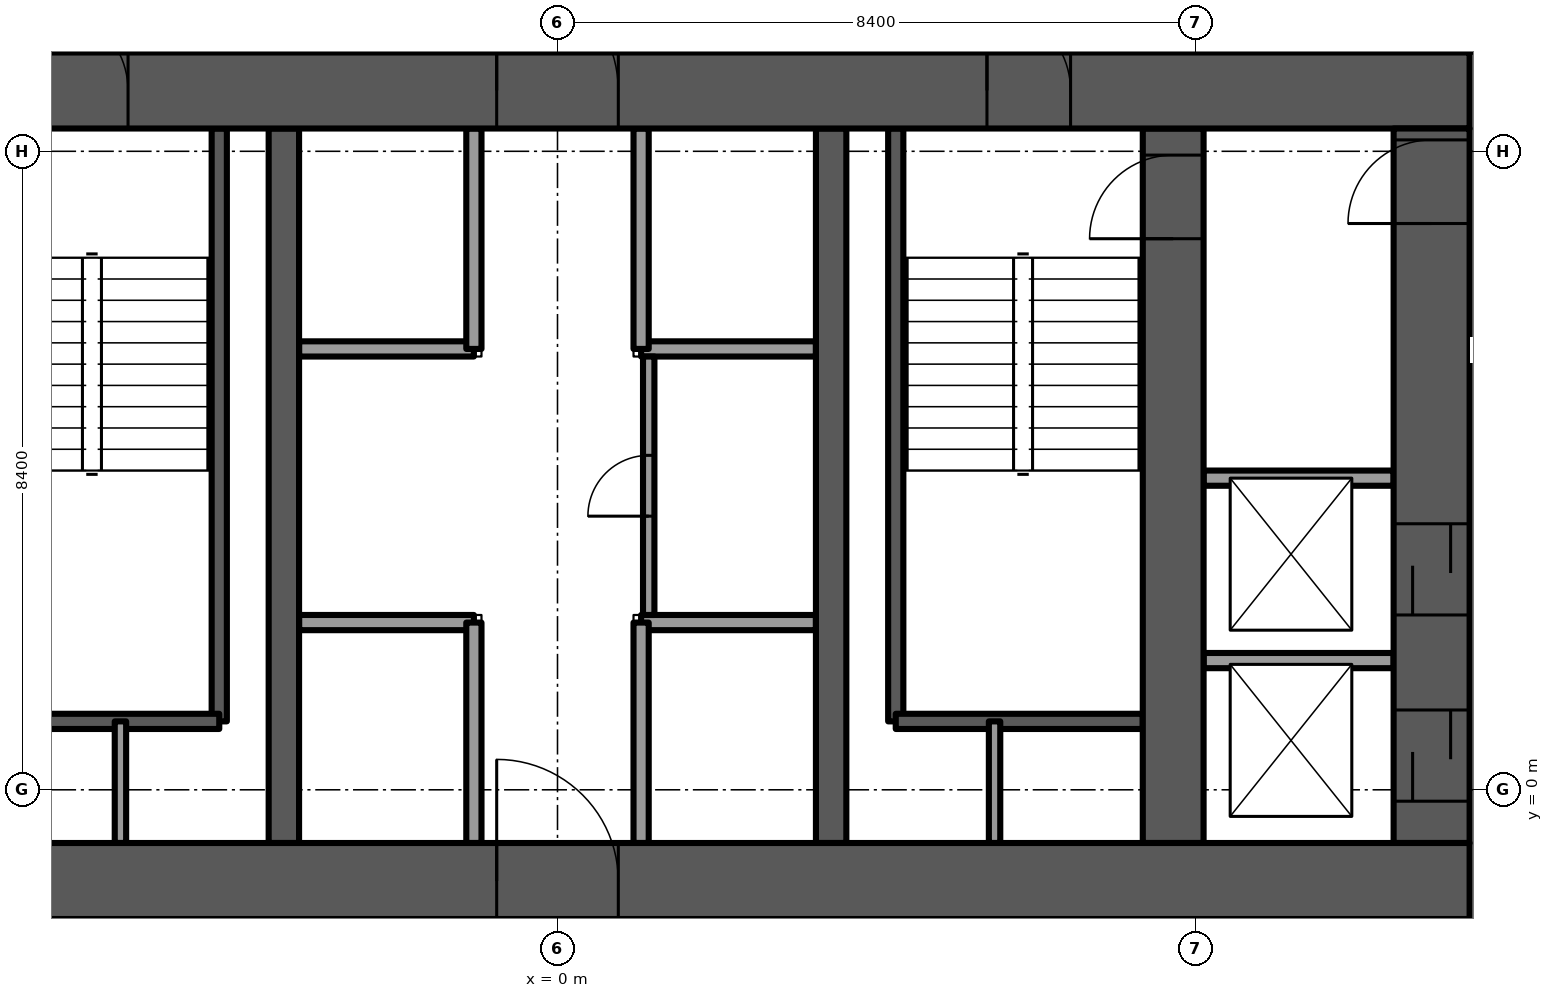
"""IFC4 building model, lengths in metres.
Left out: names, types, materials, properties, quantities, classifications, styles, units other than length and angle.
Written with IfcOpenShell. Run it as: python <this file> out.ifc"""

import sys

from ifc_helpers import new_model, si_unit, direction, frame, frame_2d, origin, place, context, subcontext, project, spatial, rectangle, extrude, element, fill, save


model = new_model("IFC4")
c1 = context("Model", 3, precision=1e-05, world=origin(), true_north=direction((0.0, 1.0)))
c2 = subcontext(c1, "Body", "Model", "MODEL_VIEW")
j1 = project(units=[si_unit("LENGTHUNIT", "METRE"), si_unit("PLANEANGLEUNIT", "RADIAN")], contexts=[c1])
p1 = place(None, origin())
s1 = spatial("IfcSite", under=j1, at=p1, CompositionType="ELEMENT")
p2 = place(p1, origin())
s2 = spatial("IfcBuilding", under=s1, at=p2, CompositionType="ELEMENT")
p3 = place(p2, frame((0.0, 0.0, 127.25)))
s3 = spatial("IfcBuildingStorey", under=s2, at=p3, CompositionType="ELEMENT", Elevation=127.25)
p4 = place(p3, frame((-12.0, -1.2, -0.3), z_axis=(0.0, 0.0, 1.0), x_axis=(1.0, 0.0, 0.0)))
e1 = element("IfcWall", 1, at=p4, inside=s3, PredefinedType="SHEAR", context=c2, shape_type="SweptSolid", body=[
    extrude(rectangle(XDim=24.0, YDim=1.0, at=frame_2d((12.0, 0.0))), origin(), (0.0, 0.0, 1.0), 3.75),
])
p5 = place(p4, frame((11.2, 0.0, 0.0)))
e2 = element("IfcOpeningElement", 2, at=p5, cuts=e1, PredefinedType="OPENING", context=c2, shape_type="SweptSolid", body=[
    extrude(rectangle(XDim=1.6, YDim=2.1, at=frame_2d((0.8, 1.05))), frame((0.0, 0.5, 0.0), z_axis=(0.0, -1.0, 0.0), x_axis=(1.0, 0.0, 0.0)), (0.0, 0.0, 1.0), 1.0),
])
p6 = place(p3, frame((-12.0, 9.2, -0.3), z_axis=(0.0, 0.0, 1.0), x_axis=(1.0, 0.0, 0.0)))
e3 = element("IfcWall", 3, at=p6, inside=s3, PredefinedType="SHEAR", context=c2, shape_type="SweptSolid", body=[
    extrude(rectangle(XDim=24.0, YDim=1.0, at=frame_2d((12.0, 0.0))), origin(), (0.0, 0.0, 1.0), 3.75),
])
p7 = place(p6, frame((11.2, 0.0, 0.0)))
e4 = element("IfcOpeningElement", 4, at=p7, cuts=e3, PredefinedType="OPENING", context=c2, shape_type="SweptSolid", body=[
    extrude(rectangle(XDim=1.6, YDim=2.1, at=frame_2d((0.8, 1.05))), frame((0.0, 0.5, 0.0), z_axis=(0.0, -1.0, 0.0), x_axis=(1.0, 0.0, 0.0)), (0.0, 0.0, 1.0), 1.0),
])
p8 = place(p6, frame((5.25, 0.0, 0.0)))
e5 = element("IfcOpeningElement", 5, at=p8, cuts=e3, PredefinedType="OPENING", context=c2, shape_type="SweptSolid", body=[
    extrude(rectangle(XDim=1.1, YDim=2.1, at=frame_2d((0.55, 1.05))), frame((0.0, 0.5, 0.0), z_axis=(0.0, -1.0, 0.0), x_axis=(1.0, 0.0, 0.0)), (0.0, 0.0, 1.0), 1.0),
])
p9 = place(p6, frame((17.65, 0.0, 0.0)))
e6 = element("IfcOpeningElement", 6, at=p9, cuts=e3, PredefinedType="OPENING", context=c2, shape_type="SweptSolid", body=[
    extrude(rectangle(XDim=1.1, YDim=2.1, at=frame_2d((0.55, 1.05))), frame((0.0, 0.5, 0.0), z_axis=(0.0, -1.0, 0.0), x_axis=(1.0, 0.0, 0.0)), (0.0, 0.0, 1.0), 1.0),
])
p10 = place(p3, frame((8.1, -0.7, -0.3), z_axis=(0.0, 0.0, 1.0), x_axis=(0.0, 1.0, 0.0)))
e7 = element("IfcWall", 7, at=p10, inside=s3, PredefinedType="SHEAR", context=c2, shape_type="SweptSolid", body=[
    extrude(rectangle(XDim=9.4, YDim=0.8, at=frame_2d((4.7, 0.0))), origin(), (0.0, 0.0, 1.0), 3.75),
])
p11 = place(p10, frame((7.95, 0.0, 0.0)))
e8 = element("IfcOpeningElement", 8, at=p11, cuts=e7, PredefinedType="OPENING", context=c2, shape_type="SweptSolid", body=[
    extrude(rectangle(XDim=1.1, YDim=2.1, at=frame_2d((0.55, 1.05))), frame((0.0, 0.4, 0.0), z_axis=(0.0, -1.0, 0.0), x_axis=(1.0, 0.0, 0.0)), (0.0, 0.0, 1.0), 0.8),
])
for number, where, z_axis, x_axis in (
    (9, (-3.6, -0.7, -0.3), (0.0, 0.0, 1.0), (0.0, 1.0, 0.0)),
    (10, (3.6, -0.7, -0.3), (0.0, 0.0, 1.0), (0.0, 1.0, 0.0)),
):
    element("IfcWall", number, at=place(p3, frame(where, z_axis=z_axis, x_axis=x_axis)), inside=s3, PredefinedType="SHEAR", context=c2, shape_type="SweptSolid", body=[
        extrude(rectangle(XDim=9.4, YDim=0.4, at=frame_2d((4.7, 0.0))), origin(), (0.0, 0.0, 1.0), 3.75),
    ])
p12 = place(p3, frame((11.5, -0.7, -0.3), z_axis=(0.0, 0.0, 1.0), x_axis=(0.0, 1.0, 0.0)))
e11 = element("IfcWall", 11, at=p12, inside=s3, PredefinedType="SHEAR", context=c2, shape_type="SweptSolid", body=[
    extrude(rectangle(XDim=9.4, YDim=1.0, at=frame_2d((4.7, 0.0))), origin(), (0.0, 0.0, 1.0), 3.75),
])
p13 = place(p12, frame((8.15, 0.0, 0.0)))
e12 = element("IfcOpeningElement", 12, at=p13, cuts=e11, PredefinedType="OPENING", context=c2, shape_type="SweptSolid", body=[
    extrude(rectangle(XDim=1.1, YDim=2.1, at=frame_2d((0.55, 1.05))), frame((0.0, 0.5, 0.0), z_axis=(0.0, -1.0, 0.0), x_axis=(1.0, 0.0, 0.0)), (0.0, 0.0, 1.0), 1.0),
])
p14 = place(p12, frame((0.55, 0.0, 0.0)))
e13 = element("IfcOpeningElement", 13, at=p14, cuts=e11, PredefinedType="OPENING", context=c2, shape_type="SweptSolid", body=[
    extrude(rectangle(XDim=1.2, YDim=2.1, at=frame_2d((0.6, 1.05))), frame((0.0, 0.5, 0.0), z_axis=(0.0, -1.0, 0.0), x_axis=(1.0, 0.0, 0.0)), (0.0, 0.0, 1.0), 1.0),
])
p15 = place(p12, frame((3.0, 0.0, 0.0)))
e14 = element("IfcOpeningElement", 14, at=p15, cuts=e11, PredefinedType="OPENING", context=c2, shape_type="SweptSolid", body=[
    extrude(rectangle(XDim=1.2, YDim=2.1, at=frame_2d((0.6, 1.05))), frame((0.0, 0.5, 0.0), z_axis=(0.0, -1.0, 0.0), x_axis=(1.0, 0.0, 0.0)), (0.0, 0.0, 1.0), 1.0),
])
p16 = place(p3, frame((10.605, -15.481, 0.0), z_axis=(0.0, 0.0, 1.0), x_axis=(0.500010582961, 0.866019293623, 0.0)))
e15 = element("IfcWall", 15, at=p16, inside=s3, PredefinedType="SOLIDWALL", context=c2, shape_type="SweptSolid", body=[
    extrude(rectangle(XDim=16.21, YDim=0.15, at=frame_2d((8.105, 0.0))), origin(), (0.0, 0.0, 1.0), 3.45),
])
p17 = place(p16, frame((2.105, 0.0, 0.15)))
e16 = element("IfcOpeningElement", 16, at=p17, cuts=e15, PredefinedType="OPENING", context=c2, shape_type="SweptSolid", body=[
    extrude(rectangle(XDim=1.7, YDim=2.85, at=frame_2d((0.85, 1.425))), frame((0.0, 0.075, 0.0), z_axis=(0.0, -1.0, 0.0), x_axis=(1.0, 0.0, 0.0)), (0.0, 0.0, 1.0), 0.15),
])
p18 = place(p16, frame((4.205, 0.0, 0.0)))
e17 = element("IfcOpeningElement", 17, at=p18, cuts=e15, PredefinedType="OPENING", context=c2, shape_type="SweptSolid", body=[
    extrude(rectangle(XDim=1.5, YDim=2.4, at=frame_2d((0.75, 1.2))), frame((0.0, 0.075, 0.0), z_axis=(0.0, -1.0, 0.0), x_axis=(1.0, 0.0, 0.0)), (0.0, 0.0, 1.0), 0.15),
])
p19 = place(p16, frame((6.305, 0.0, 0.15)))
e18 = element("IfcOpeningElement", 18, at=p19, cuts=e15, PredefinedType="OPENING", context=c2, shape_type="SweptSolid", body=[
    extrude(rectangle(XDim=1.7, YDim=2.85, at=frame_2d((0.85, 1.425))), frame((0.0, 0.075, 0.0), z_axis=(0.0, -1.0, 0.0), x_axis=(1.0, 0.0, 0.0)), (0.0, 0.0, 1.0), 0.15),
])
p20 = place(p16, frame((8.228, 0.0, 0.0)))
e19 = element("IfcOpeningElement", 19, at=p20, cuts=e15, PredefinedType="OPENING", context=c2, shape_type="SweptSolid", body=[
    extrude(rectangle(XDim=1.5, YDim=2.4, at=frame_2d((0.75, 1.2))), frame((0.0, 0.075, 0.0), z_axis=(0.0, -1.0, 0.0), x_axis=(1.0, 0.0, 0.0)), (0.0, 0.0, 1.0), 0.15),
])
p21 = place(p16, frame((11.78, 0.0, 0.15)))
e20 = element("IfcOpeningElement", 20, at=p21, cuts=e15, PredefinedType="OPENING", context=c2, shape_type="SweptSolid", body=[
    extrude(rectangle(XDim=1.5, YDim=2.85, at=frame_2d((0.75, 1.425))), frame((0.0, 0.075, 0.0), z_axis=(0.0, -1.0, 0.0), x_axis=(1.0, 0.0, 0.0)), (0.0, 0.0, 1.0), 0.15),
])
p22 = place(p16, frame((0.402, 0.0, 0.15)))
e21 = element("IfcOpeningElement", 21, at=p22, cuts=e15, PredefinedType="OPENING", context=c2, shape_type="SweptSolid", body=[
    extrude(rectangle(XDim=0.9, YDim=2.73, at=frame_2d((0.45, 1.365))), frame((0.0, 0.075, 0.0), z_axis=(0.0, -1.0, 0.0), x_axis=(1.0, 0.0, 0.0)), (0.0, 0.0, 1.0), 0.15),
])
p23 = place(p16, frame((14.907, 0.0, 0.15)))
e22 = element("IfcOpeningElement", 22, at=p23, cuts=e15, PredefinedType="OPENING", context=c2, shape_type="SweptSolid", body=[
    extrude(rectangle(XDim=0.9, YDim=2.73, at=frame_2d((0.45, 1.365))), frame((0.0, 0.075, 0.0), z_axis=(0.0, -1.0, 0.0), x_axis=(1.0, 0.0, 0.0)), (0.0, 0.0, 1.0), 0.15),
])
p24 = place(p3, frame((18.71, -0.378, 0.0), z_axis=(0.0, 0.0, 1.0), x_axis=(-0.500001219746, 0.866024699562, 0.0)))
e23 = element("IfcWall", 23, at=p24, inside=s3, PredefinedType="SOLIDWALL", context=c2, shape_type="SweptSolid", body=[
    extrude(rectangle(XDim=22.137, YDim=0.15, at=frame_2d((11.068, 0.0))), origin(), (0.0, 0.0, 1.0), 3.45),
])
p25 = place(p24, frame((1.583, 0.0, 0.15)))
e24 = element("IfcOpeningElement", 24, at=p25, cuts=e23, PredefinedType="OPENING", context=c2, shape_type="SweptSolid", body=[
    extrude(rectangle(XDim=1.7, YDim=2.85, at=frame_2d((0.85, 1.425))), frame((0.0, 0.075, 0.0), z_axis=(0.0, -1.0, 0.0), x_axis=(1.0, 0.0, 0.0)), (0.0, 0.0, 1.0), 0.15),
])
p26 = place(p24, frame((3.438, 0.0, 0.0)))
e25 = element("IfcOpeningElement", 25, at=p26, cuts=e23, PredefinedType="OPENING", context=c2, shape_type="SweptSolid", body=[
    extrude(rectangle(XDim=1.5, YDim=2.4, at=frame_2d((0.75, 1.2))), frame((0.0, 0.075, 0.0), z_axis=(0.0, -1.0, 0.0), x_axis=(1.0, 0.0, 0.0)), (0.0, 0.0, 1.0), 0.15),
])
p27 = place(p24, frame((6.188, 0.0, 0.15)))
e26 = element("IfcOpeningElement", 26, at=p27, cuts=e23, PredefinedType="OPENING", context=c2, shape_type="SweptSolid", body=[
    extrude(rectangle(XDim=0.9, YDim=2.85, at=frame_2d((0.45, 1.425))), frame((0.0, 0.075, 0.0), z_axis=(0.0, -1.0, 0.0), x_axis=(1.0, 0.0, 0.0)), (0.0, 0.0, 1.0), 0.15),
])
p28 = place(p24, frame((7.883, 0.0, 0.15)))
e27 = element("IfcOpeningElement", 27, at=p28, cuts=e23, PredefinedType="OPENING", context=c2, shape_type="SweptSolid", body=[
    extrude(rectangle(XDim=1.5, YDim=2.85, at=frame_2d((0.75, 1.425))), frame((0.0, 0.075, 0.0), z_axis=(0.0, -1.0, 0.0), x_axis=(1.0, 0.0, 0.0)), (0.0, 0.0, 1.0), 0.15),
])
p29 = place(p24, frame((12.481, 0.0, 0.15)))
e28 = element("IfcOpeningElement", 28, at=p29, cuts=e23, PredefinedType="OPENING", context=c2, shape_type="SweptSolid", body=[
    extrude(rectangle(XDim=0.9, YDim=2.85, at=frame_2d((0.45, 1.425))), frame((0.0, 0.075, 0.0), z_axis=(0.0, -1.0, 0.0), x_axis=(1.0, 0.0, 0.0)), (0.0, 0.0, 1.0), 0.15),
])
p30 = place(p24, frame((10.281, 0.0, 0.15)))
e29 = element("IfcOpeningElement", 29, at=p30, cuts=e23, PredefinedType="OPENING", context=c2, shape_type="SweptSolid", body=[
    extrude(rectangle(XDim=1.5, YDim=2.85, at=frame_2d((0.75, 1.425))), frame((0.0, 0.075, 0.0), z_axis=(0.0, -1.0, 0.0), x_axis=(1.0, 0.0, 0.0)), (0.0, 0.0, 1.0), 0.15),
])
p31 = place(p24, frame((16.465, 0.0, 0.15)))
e30 = element("IfcOpeningElement", 30, at=p31, cuts=e23, PredefinedType="OPENING", context=c2, shape_type="SweptSolid", body=[
    extrude(rectangle(XDim=0.9, YDim=2.85, at=frame_2d((0.45, 1.425))), frame((0.0, 0.075, 0.0), z_axis=(0.0, -1.0, 0.0), x_axis=(1.0, 0.0, 0.0)), (0.0, 0.0, 1.0), 0.15),
])
p32 = place(p24, frame((14.265, 0.0, 0.15)))
e31 = element("IfcOpeningElement", 31, at=p32, cuts=e23, PredefinedType="OPENING", context=c2, shape_type="SweptSolid", body=[
    extrude(rectangle(XDim=1.5, YDim=2.85, at=frame_2d((0.75, 1.425))), frame((0.0, 0.075, 0.0), z_axis=(0.0, -1.0, 0.0), x_axis=(1.0, 0.0, 0.0)), (0.0, 0.0, 1.0), 0.15),
])
p33 = place(p24, frame((19.415, 0.0, 0.15)))
e32 = element("IfcOpeningElement", 32, at=p33, cuts=e23, PredefinedType="OPENING", context=c2, shape_type="SweptSolid", body=[
    extrude(rectangle(XDim=1.7, YDim=2.73, at=frame_2d((0.85, 1.365))), frame((0.0, 0.075, 0.0), z_axis=(0.0, -1.0, 0.0), x_axis=(1.0, 0.0, 0.0)), (0.0, 0.0, 1.0), 0.15),
])
for number, where, z_axis, x_axis in (
    (33, (-3.4, 2.2, 0.0), (0.0, 0.0, 1.0), (1.0, 0.0, 0.0)),
    (34, (-3.4, 5.8, 0.0), (0.0, 0.0, 1.0), (1.0, 0.0, 0.0)),
    (35, (1.1, 2.2, 0.0), (0.0, 0.0, 1.0), (1.0, 0.0, 0.0)),
    (36, (1.1, 5.8, 0.0), (0.0, 0.0, 1.0), (1.0, 0.0, 0.0)),
):
    element("IfcWall", number, at=place(p3, frame(where, z_axis=z_axis, x_axis=x_axis)), inside=s3, PredefinedType="PARTITIONING", context=c2, shape_type="SweptSolid", body=[
        extrude(rectangle(XDim=2.3, YDim=0.2, at=frame_2d((1.15, 0.0))), origin(), (0.0, 0.0, 1.0), 3.45),
    ])
for number, where, z_axis, x_axis in (
    (37, (-1.1, -0.7, 0.0), (0.0, 0.0, 1.0), (0.0, 1.0, 0.0)),
    (38, (1.1, -0.7, 0.0), (0.0, 0.0, 1.0), (0.0, 1.0, 0.0)),
    (39, (-1.1, 5.8, 0.0), (0.0, 0.0, 1.0), (0.0, 1.0, 0.0)),
    (40, (1.1, 5.8, 0.0), (0.0, 0.0, 1.0), (0.0, 1.0, 0.0)),
):
    element("IfcWall", number, at=place(p3, frame(where, z_axis=z_axis, x_axis=x_axis)), inside=s3, PredefinedType="PARTITIONING", context=c2, shape_type="SweptSolid", body=[
        extrude(rectangle(XDim=2.9, YDim=0.2, at=frame_2d((1.45, 0.0))), origin(), (0.0, 0.0, 1.0), 3.45),
    ])
p34 = place(p3, frame((-4.45, 0.9, -0.3), z_axis=(0.0, 0.0, 1.0), x_axis=(0.0, 1.0, 0.0)))
e41 = element("IfcWall", 41, at=p34, inside=s3, PredefinedType="SOLIDWALL", context=c2, shape_type="SweptSolid", body=[
    extrude(rectangle(XDim=7.8, YDim=0.2, at=frame_2d((3.9, 0.0))), origin(), (0.0, 0.0, 1.0), 3.75),
])
p35 = place(p3, frame((-7.7, 0.9, -0.3), z_axis=(0.0, 0.0, 1.0), x_axis=(1.0, 0.0, 0.0)))
e42 = element("IfcWall", 42, at=p35, inside=s3, PredefinedType="SOLIDWALL", context=c2, shape_type="SweptSolid", body=[
    extrude(rectangle(XDim=3.25, YDim=0.2, at=frame_2d((1.625, 0.0))), origin(), (0.0, 0.0, 1.0), 3.75),
])
p36 = place(p3, frame((-5.75, -0.7, 0.0), z_axis=(0.0, 0.0, 1.0), x_axis=(0.0, 1.0, 0.0)))
e43 = element("IfcWall", 43, at=p36, inside=s3, PredefinedType="PARTITIONING", context=c2, shape_type="SweptSolid", body=[
    extrude(rectangle(XDim=1.6, YDim=0.15, at=frame_2d((0.8, 0.0))), origin(), (0.0, 0.0, 1.0), 3.45),
])
p37 = place(p3, frame((4.45, 0.9, -0.3), z_axis=(0.0, 0.0, 1.0), x_axis=(0.0, 1.0, 0.0)))
e44 = element("IfcWall", 44, at=p37, inside=s3, PredefinedType="SOLIDWALL", context=c2, shape_type="SweptSolid", body=[
    extrude(rectangle(XDim=7.8, YDim=0.2, at=frame_2d((3.9, 0.0))), origin(), (0.0, 0.0, 1.0), 3.75),
])
p38 = place(p3, frame((4.45, 0.9, -0.3), z_axis=(0.0, 0.0, 1.0), x_axis=(1.0, 0.0, 0.0)))
e45 = element("IfcWall", 45, at=p38, inside=s3, PredefinedType="SOLIDWALL", context=c2, shape_type="SweptSolid", body=[
    extrude(rectangle(XDim=3.25, YDim=0.2, at=frame_2d((1.625, 0.0))), origin(), (0.0, 0.0, 1.0), 3.75),
])
p39 = place(p3, frame((5.75, -0.7, 0.0), z_axis=(0.0, 0.0, 1.0), x_axis=(0.0, 1.0, 0.0)))
e46 = element("IfcWall", 46, at=p39, inside=s3, PredefinedType="PARTITIONING", context=c2, shape_type="SweptSolid", body=[
    extrude(rectangle(XDim=1.6, YDim=0.15, at=frame_2d((0.8, 0.0))), origin(), (0.0, 0.0, 1.0), 3.45),
])
p40 = place(p3, frame((1.2, 2.3, 0.0), z_axis=(0.0, 0.0, 1.0), x_axis=(0.0, 1.0, 0.0)))
e47 = element("IfcWall", 47, at=p40, inside=s3, PredefinedType="PARTITIONING", context=c2, shape_type="SweptSolid", body=[
    extrude(rectangle(XDim=3.4, YDim=0.15, at=frame_2d((1.7, 0.0))), origin(), (0.0, 0.0, 1.0), 3.45),
])
p41 = place(p40, frame((1.3, 0.0, 0.0)))
e48 = element("IfcOpeningElement", 48, at=p41, cuts=e47, PredefinedType="OPENING", context=c2, shape_type="SweptSolid", body=[
    extrude(rectangle(XDim=0.8, YDim=2.1, at=frame_2d((0.4, 1.05))), frame((0.0, 0.075, 0.0), z_axis=(0.0, -1.0, 0.0), x_axis=(1.0, 0.0, 0.0)), (0.0, 0.0, 1.0), 0.15),
])
for number, where, z_axis, x_axis in (
    (49, (8.5, 1.7, 0.0), (0.0, 0.0, 1.0), (1.0, 0.0, 0.0)),
    (50, (8.5, 4.1, 0.0), (0.0, 0.0, 1.0), (1.0, 0.0, 0.0)),
):
    element("IfcWall", number, at=place(p3, frame(where, z_axis=z_axis, x_axis=x_axis)), inside=s3, PredefinedType="PARTITIONING", context=c2, shape_type="SweptSolid", body=[
        extrude(rectangle(XDim=2.5, YDim=0.2, at=frame_2d((1.25, 0.0))), origin(), (0.0, 0.0, 1.0), 3.45),
    ])
p42 = place(p5, origin())
e51 = element("IfcDoor", 51, at=p42, inside=s3, OperationType="DOUBLE_DOOR_SINGLE_SWING", PredefinedType="DOOR", context=c2, shape_type="SweptSolid", body=[
    extrude(rectangle(XDim=1.6, YDim=2.1, at=frame_2d((0.8, 1.05))), frame((0.0, 0.025, 0.0), z_axis=(0.0, -1.0, 0.0), x_axis=(1.0, 0.0, 0.0)), (0.0, 0.0, 1.0), 0.05),
])
fill(e2, e51)
p43 = place(p7, origin())
e52 = element("IfcDoor", 52, at=p43, inside=s3, OperationType="DOUBLE_DOOR_SINGLE_SWING", PredefinedType="DOOR", context=c2, shape_type="SweptSolid", body=[
    extrude(rectangle(XDim=1.6, YDim=2.1, at=frame_2d((0.8, 1.05))), frame((0.0, 0.025, 0.0), z_axis=(0.0, -1.0, 0.0), x_axis=(1.0, 0.0, 0.0)), (0.0, 0.0, 1.0), 0.05),
])
fill(e4, e52)
p44 = place(p8, origin())
e53 = element("IfcDoor", 53, at=p44, inside=s3, OperationType="SINGLE_SWING_LEFT", PredefinedType="DOOR", context=c2, shape_type="SweptSolid", body=[
    extrude(rectangle(XDim=1.1, YDim=2.1, at=frame_2d((0.55, 1.05))), frame((0.0, 0.025, 0.0), z_axis=(0.0, -1.0, 0.0), x_axis=(1.0, 0.0, 0.0)), (0.0, 0.0, 1.0), 0.05),
])
fill(e5, e53)
p45 = place(p9, origin())
e54 = element("IfcDoor", 54, at=p45, inside=s3, OperationType="SINGLE_SWING_RIGHT", PredefinedType="DOOR", context=c2, shape_type="SweptSolid", body=[
    extrude(rectangle(XDim=1.1, YDim=2.1, at=frame_2d((0.55, 1.05))), frame((0.0, 0.025, 0.0), z_axis=(0.0, -1.0, 0.0), x_axis=(1.0, 0.0, 0.0)), (0.0, 0.0, 1.0), 0.05),
])
fill(e6, e54)
p46 = place(p11, origin())
e55 = element("IfcDoor", 55, at=p46, inside=s3, OperationType="SINGLE_SWING_LEFT", PredefinedType="DOOR", context=c2, shape_type="SweptSolid", body=[
    extrude(rectangle(XDim=1.1, YDim=2.1, at=frame_2d((0.55, 1.05))), frame((0.0, 0.025, 0.0), z_axis=(0.0, -1.0, 0.0), x_axis=(1.0, 0.0, 0.0)), (0.0, 0.0, 1.0), 0.05),
])
fill(e8, e55)
p47 = place(p41, origin())
e56 = element("IfcDoor", 56, at=p47, inside=s3, OperationType="SINGLE_SWING_RIGHT", PredefinedType="DOOR", context=c2, shape_type="SweptSolid", body=[
    extrude(rectangle(XDim=0.8, YDim=2.1, at=frame_2d((0.4, 1.05))), frame((0.0, 0.025, 0.0), z_axis=(0.0, -1.0, 0.0), x_axis=(1.0, 0.0, 0.0)), (0.0, 0.0, 1.0), 0.05),
])
fill(e48, e56)
p48 = place(p13, origin())
e57 = element("IfcDoor", 57, at=p48, inside=s3, OperationType="SINGLE_SWING_RIGHT", PredefinedType="DOOR", context=c2, shape_type="SweptSolid", body=[
    extrude(rectangle(XDim=1.1, YDim=2.1, at=frame_2d((0.55, 1.05))), frame((0.0, 0.025, 0.0), z_axis=(0.0, -1.0, 0.0), x_axis=(1.0, 0.0, 0.0)), (0.0, 0.0, 1.0), 0.05),
])
fill(e12, e57)
p49 = place(p14, origin())
e58 = element("IfcDoor", 58, at=p49, inside=s3, OperationType="SLIDING_TO_LEFT", PredefinedType="DOOR", context=c2, shape_type="SweptSolid", body=[
    extrude(rectangle(XDim=1.2, YDim=2.1, at=frame_2d((0.6, 1.05))), frame((0.0, 0.025, 0.0), z_axis=(0.0, -1.0, 0.0), x_axis=(1.0, 0.0, 0.0)), (0.0, 0.0, 1.0), 0.05),
])
fill(e13, e58)
p50 = place(p15, origin())
e59 = element("IfcDoor", 59, at=p50, inside=s3, OperationType="SLIDING_TO_LEFT", PredefinedType="DOOR", context=c2, shape_type="SweptSolid", body=[
    extrude(rectangle(XDim=1.2, YDim=2.1, at=frame_2d((0.6, 1.05))), frame((0.0, 0.025, 0.0), z_axis=(0.0, -1.0, 0.0), x_axis=(1.0, 0.0, 0.0)), (0.0, 0.0, 1.0), 0.05),
])
fill(e14, e59)
save(model, sys.argv[1])
